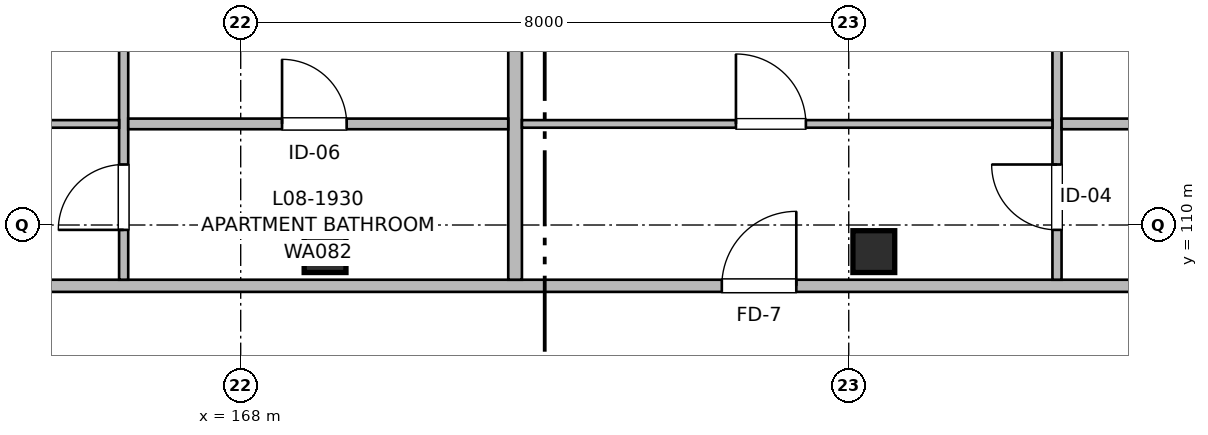
"""IFC4 building model, lengths in metres.
Left out: names, types, materials, properties, quantities, classifications, styles, units other than length and angle.
Written with IfcOpenShell. Run it as: python <this file> out.ifc"""

import sys

from ifc_helpers import new_model, si_unit, direction, frame, frame_2d, origin, origin_2d, place, context, subcontext, project, spatial, rectangle, extrude, element, fill, save


model = new_model("IFC4")
c1 = context("Model", 3, precision=1e-05, world=origin(), true_north=direction((0.0, 1.0)))
c2 = subcontext(c1, "Body", "Model", "MODEL_VIEW")
j1 = project(units=[si_unit("LENGTHUNIT", "METRE"), si_unit("PLANEANGLEUNIT", "RADIAN")], contexts=[c1])
p1 = place(None, origin())
s1 = spatial("IfcSite", under=j1, at=p1, CompositionType="ELEMENT")
p2 = place(p1, origin())
s2 = spatial("IfcBuilding", under=s1, at=p2, CompositionType="ELEMENT")
p3 = place(p2, frame((0.0, 0.0, 26.56)))
s3 = spatial("IfcBuildingStorey", under=s2, at=p3, CompositionType="ELEMENT", Elevation=26.56)
for number, where, z_axis, x_axis in (
    (1, (169.11, 109.65, 0.0), (0.0, 0.0, 1.0), (1.0, 0.0, 0.0)),
    (2, (176.33, 109.65, 0.0), (0.0, 0.0, 1.0), (1.0, 0.0, 0.0)),
):
    element("IfcColumn", number, at=place(p3, frame(where, z_axis=z_axis, x_axis=x_axis)), inside=s3, PredefinedType="COLUMN", context=c2, shape_type="SweptSolid", body=[
        extrude(rectangle(XDim=0.55, YDim=0.55, at=origin_2d()), origin(), (0.0, 0.0, 1.0), 3.2),
    ])
p4 = place(p3, frame((147.16, 109.2, 0.0), z_axis=(0.0, 0.0, 1.0), x_axis=(1.0, 0.0, 0.0)))
e3 = element("IfcWall", 3, at=p4, inside=s3, PredefinedType="PARTITIONING", context=c2, shape_type="SweptSolid", body=[
    extrude(rectangle(XDim=36.68, YDim=0.16, at=frame_2d((18.34, 0.0))), origin(), (0.0, 0.0, 1.0), 2.935),
])
p5 = place(p4, frame((3.03, 0.0, 0.0)))
e4 = element("IfcOpeningElement", 4, at=p5, cuts=e3, PredefinedType="OPENING", context=c2, shape_type="SweptSolid", body=[
    extrude(rectangle(XDim=0.98, YDim=2.15, at=frame_2d((0.49, 1.075))), frame((0.0, 0.09, 0.0), z_axis=(0.0, -1.0, 0.0), x_axis=(1.0, 0.0, 0.0)), (0.0, 0.0, 1.0), 0.18),
])
p6 = place(p4, frame((15.72, 0.0, 0.0)))
e5 = element("IfcOpeningElement", 5, at=p6, cuts=e3, PredefinedType="OPENING", context=c2, shape_type="SweptSolid", body=[
    extrude(rectangle(XDim=0.98, YDim=2.15, at=frame_2d((0.49, 1.075))), frame((0.0, 0.09, 0.0), z_axis=(0.0, -1.0, 0.0), x_axis=(1.0, 0.0, 0.0)), (0.0, 0.0, 1.0), 0.18),
])
p7 = place(p4, frame((27.17, 0.0, 0.0)))
e6 = element("IfcOpeningElement", 6, at=p7, cuts=e3, PredefinedType="OPENING", context=c2, shape_type="SweptSolid", body=[
    extrude(rectangle(XDim=0.98, YDim=2.15, at=frame_2d((0.49, 1.075))), frame((0.0, 0.09, 0.0), z_axis=(0.0, -1.0, 0.0), x_axis=(1.0, 0.0, 0.0)), (0.0, 0.0, 1.0), 0.18),
])
p8 = place(p3, frame((171.61, 109.28, 0.0), z_axis=(0.0, 0.0, 1.0), x_axis=(0.0, 1.0, 0.0)))
e7 = element("IfcWall", 7, at=p8, inside=s3, PredefinedType="PARTITIONING", context=c2, shape_type="SweptSolid", body=[
    extrude(rectangle(XDim=6.6, YDim=0.18, at=frame_2d((3.3, 0.0))), origin(), (0.0, 0.0, 1.0), 2.935),
])
p9 = place(p3, frame((166.46, 109.28, 0.0), z_axis=(0.0, 0.0, 1.0), x_axis=(0.0, 1.0, 0.0)))
e8 = element("IfcWall", 8, at=p9, inside=s3, PredefinedType="PARTITIONING", context=c2, shape_type="SweptSolid", body=[
    extrude(rectangle(XDim=6.6, YDim=0.12, at=frame_2d((3.3, 0.0))), origin(), (0.0, 0.0, 1.0), 2.935),
])
p10 = place(p9, frame((0.656, 0.0, 0.0)))
e9 = element("IfcOpeningElement", 9, at=p10, cuts=e8, PredefinedType="OPENING", context=c2, shape_type="SweptSolid", body=[
    extrude(rectangle(XDim=0.86, YDim=2.1, at=frame_2d((0.43, 1.05))), frame((0.0, 0.07, 0.0), z_axis=(0.0, -1.0, 0.0), x_axis=(1.0, 0.0, 0.0)), (0.0, 0.0, 1.0), 0.14),
])
p11 = place(p9, frame((4.097, 0.0, 0.0)))
e10 = element("IfcOpeningElement", 10, at=p11, cuts=e8, PredefinedType="OPENING", context=c2, shape_type="SweptSolid", body=[
    extrude(rectangle(XDim=0.9, YDim=2.1, at=frame_2d((0.45, 1.05))), frame((0.0, 0.07, 0.0), z_axis=(0.0, -1.0, 0.0), x_axis=(1.0, 0.0, 0.0)), (0.0, 0.0, 1.0), 0.14),
])
p12 = place(p3, frame((166.52, 111.33, 0.0), z_axis=(0.0, 0.0, 1.0), x_axis=(1.0, 0.0, 0.0)))
e11 = element("IfcWall", 11, at=p12, inside=s3, PredefinedType="PARTITIONING", context=c2, shape_type="SweptSolid", body=[
    extrude(rectangle(XDim=5.0, YDim=0.14, at=frame_2d((2.5, 0.0))), origin(), (0.0, 0.0, 1.0), 2.935),
])
p13 = place(p12, frame((2.024, 0.0, 0.0)))
e12 = element("IfcOpeningElement", 12, at=p13, cuts=e11, PredefinedType="OPENING", context=c2, shape_type="SweptSolid", body=[
    extrude(rectangle(XDim=0.85, YDim=2.05, at=frame_2d((0.425, 1.025))), frame((0.0, 0.08, 0.0), z_axis=(0.0, -1.0, 0.0), x_axis=(1.0, 0.0, 0.0)), (0.0, 0.0, 1.0), 0.16),
])
p14 = place(p3, frame((159.48, 111.33, 0.0), z_axis=(0.0, 0.0, 1.0), x_axis=(1.0, 0.0, 0.0)))
e13 = element("IfcWall", 13, at=p14, inside=s3, PredefinedType="PARTITIONING", context=c2, shape_type="SweptSolid", body=[
    extrude(rectangle(XDim=6.92, YDim=0.1, at=frame_2d((3.46, 0.0))), origin(), (0.0, 0.0, 1.0), 2.935),
])
p15 = place(p14, frame((2.792, 0.0, 0.0)))
e14 = element("IfcOpeningElement", 14, at=p15, cuts=e13, PredefinedType="OPENING", context=c2, shape_type="SweptSolid", body=[
    extrude(rectangle(XDim=0.92, YDim=2.1, at=frame_2d((0.46, 1.05))), frame((0.0, 0.06, 0.0), z_axis=(0.0, -1.0, 0.0), x_axis=(1.0, 0.0, 0.0)), (0.0, 0.0, 1.0), 0.12),
])
p16 = place(p3, frame((178.74, 109.28, 0.0), z_axis=(0.0, 0.0, 1.0), x_axis=(0.0, 1.0, 0.0)))
e15 = element("IfcWall", 15, at=p16, inside=s3, PredefinedType="PARTITIONING", context=c2, shape_type="SweptSolid", body=[
    extrude(rectangle(XDim=6.6, YDim=0.12, at=frame_2d((3.3, 0.0))), origin(), (0.0, 0.0, 1.0), 2.935),
])
p17 = place(p16, frame((0.656, 0.0, 0.0)))
e16 = element("IfcOpeningElement", 16, at=p17, cuts=e15, PredefinedType="OPENING", context=c2, shape_type="SweptSolid", body=[
    extrude(rectangle(XDim=0.86, YDim=2.1, at=frame_2d((0.43, 1.05))), frame((0.0, 0.07, 0.0), z_axis=(0.0, -1.0, 0.0), x_axis=(1.0, 0.0, 0.0)), (0.0, 0.0, 1.0), 0.14),
])
p18 = place(p16, frame((4.097, 0.0, 0.0)))
e17 = element("IfcOpeningElement", 17, at=p18, cuts=e15, PredefinedType="OPENING", context=c2, shape_type="SweptSolid", body=[
    extrude(rectangle(XDim=0.9, YDim=2.1, at=frame_2d((0.45, 1.05))), frame((0.0, 0.07, 0.0), z_axis=(0.0, -1.0, 0.0), x_axis=(1.0, 0.0, 0.0)), (0.0, 0.0, 1.0), 0.14),
])
p19 = place(p3, frame((178.8, 111.33, 0.0), z_axis=(0.0, 0.0, 1.0), x_axis=(1.0, 0.0, 0.0)))
e18 = element("IfcWall", 18, at=p19, inside=s3, PredefinedType="PARTITIONING", context=c2, shape_type="SweptSolid", body=[
    extrude(rectangle(XDim=5.04, YDim=0.14, at=frame_2d((2.52, 0.0))), origin(), (0.0, 0.0, 1.0), 2.935),
])
p20 = place(p19, frame((2.04, 0.0, 0.0)))
e19 = element("IfcOpeningElement", 19, at=p20, cuts=e18, PredefinedType="OPENING", context=c2, shape_type="SweptSolid", body=[
    extrude(rectangle(XDim=0.85, YDim=2.05, at=frame_2d((0.425, 1.025))), frame((0.0, 0.08, 0.0), z_axis=(0.0, -1.0, 0.0), x_axis=(1.0, 0.0, 0.0)), (0.0, 0.0, 1.0), 0.16),
])
p21 = place(p3, frame((171.7, 111.33, 0.0), z_axis=(0.0, 0.0, 1.0), x_axis=(1.0, 0.0, 0.0)))
e20 = element("IfcWall", 20, at=p21, inside=s3, PredefinedType="PARTITIONING", context=c2, shape_type="SweptSolid", body=[
    extrude(rectangle(XDim=6.98, YDim=0.1, at=frame_2d((3.49, 0.0))), origin(), (0.0, 0.0, 1.0), 2.935),
])
p22 = place(p21, frame((2.816, 0.0, 0.0)))
e21 = element("IfcOpeningElement", 21, at=p22, cuts=e20, PredefinedType="OPENING", context=c2, shape_type="SweptSolid", body=[
    extrude(rectangle(XDim=0.92, YDim=2.1, at=frame_2d((0.46, 1.05))), frame((0.0, 0.06, 0.0), z_axis=(0.0, -1.0, 0.0), x_axis=(1.0, 0.0, 0.0)), (0.0, 0.0, 1.0), 0.12),
])
p23 = place(p10, origin())
e22 = element("IfcDoor", 22, at=p23, inside=s3, OperationType="SINGLE_SWING_LEFT", PredefinedType="DOOR", context=c2, shape_type="SweptSolid", body=[
    extrude(rectangle(XDim=0.86, YDim=2.1, at=frame_2d((0.43, 1.05))), frame((0.0, 0.025, 0.0), z_axis=(0.0, -1.0, 0.0), x_axis=(1.0, 0.0, 0.0)), (0.0, 0.0, 1.0), 0.05),
])
fill(e9, e22)
p24 = place(p13, origin())
e23 = element("IfcDoor", 23, at=p24, inside=s3, OperationType="SINGLE_SWING_LEFT", PredefinedType="DOOR", context=c2, shape_type="SweptSolid", body=[
    extrude(rectangle(XDim=0.85, YDim=2.05, at=frame_2d((0.425, 1.025))), frame((0.0, 0.025, 0.0), z_axis=(0.0, -1.0, 0.0), x_axis=(1.0, 0.0, 0.0)), (0.0, 0.0, 1.0), 0.05),
])
fill(e12, e23)
p25 = place(p7, origin())
e24 = element("IfcDoor", 24, at=p25, inside=s3, OperationType="SINGLE_SWING_RIGHT", PredefinedType="DOOR", context=c2, shape_type="SweptSolid", body=[
    extrude(rectangle(XDim=0.98, YDim=2.15, at=frame_2d((0.49, 1.075))), frame((0.0, 0.025, 0.0), z_axis=(0.0, -1.0, 0.0), x_axis=(1.0, 0.0, 0.0)), (0.0, 0.0, 1.0), 0.05),
])
fill(e6, e24)
p26 = place(p22, origin())
e25 = element("IfcDoor", 25, at=p26, inside=s3, OperationType="SINGLE_SWING_LEFT", PredefinedType="DOOR", context=c2, shape_type="SweptSolid", body=[
    extrude(rectangle(XDim=0.92, YDim=2.1, at=frame_2d((0.46, 1.05))), frame((0.0, 0.025, 0.0), z_axis=(0.0, -1.0, 0.0), x_axis=(1.0, 0.0, 0.0)), (0.0, 0.0, 1.0), 0.05),
])
fill(e21, e25)
p27 = place(p17, origin())
e26 = element("IfcDoor", 26, at=p27, inside=s3, OperationType="SINGLE_SWING_RIGHT", PredefinedType="DOOR", context=c2, shape_type="SweptSolid", body=[
    extrude(rectangle(XDim=0.86, YDim=2.1, at=frame_2d((0.43, 1.05))), frame((0.0, 0.025, 0.0), z_axis=(0.0, -1.0, 0.0), x_axis=(1.0, 0.0, 0.0)), (0.0, 0.0, 1.0), 0.05),
])
fill(e16, e26)
save(model, sys.argv[1])
